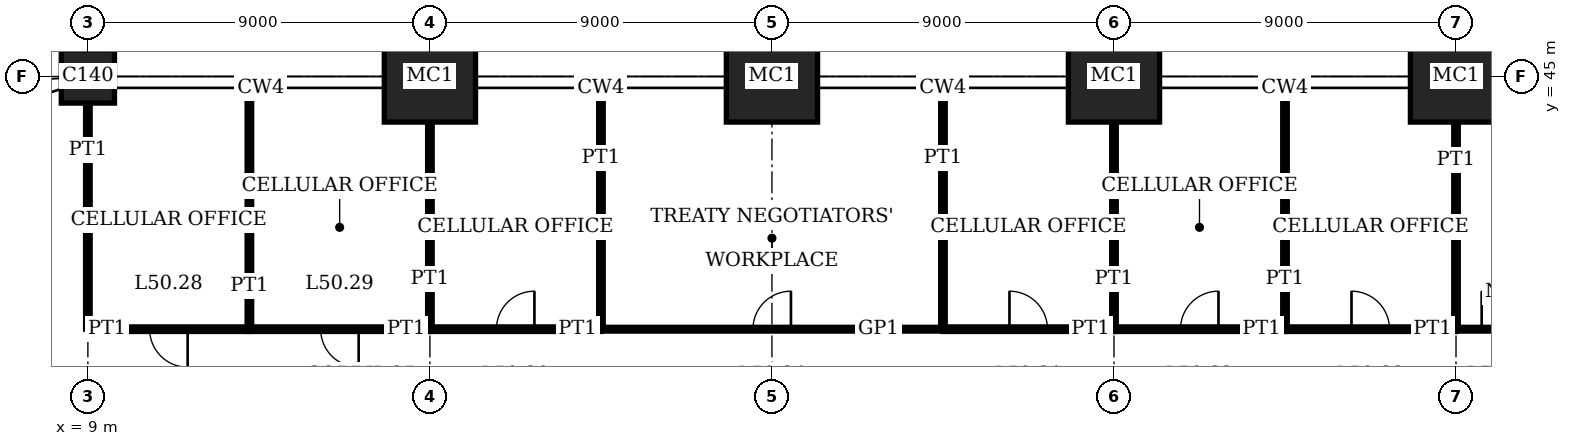
"""IFC4 building model, lengths in metres.
Left out: names, types, materials, properties, quantities, classifications, styles, units other than length and angle.
Written with IfcOpenShell. Run it as: python <this file> out.ifc"""

import sys

from ifc_helpers import new_model, si_unit, direction, frame, frame_2d, origin, origin_2d, place, context, subcontext, project, spatial, rectangle, extrude, element, fill, save


model = new_model("IFC4")
c1 = context("Model", 3, precision=1e-05, world=origin(), true_north=direction((0.0, 1.0)))
c2 = subcontext(c1, "Body", "Model", "MODEL_VIEW")
j1 = project(units=[si_unit("LENGTHUNIT", "METRE"), si_unit("PLANEANGLEUNIT", "RADIAN")], contexts=[c1])
p1 = place(None, origin())
s1 = spatial("IfcSite", under=j1, at=p1, CompositionType="ELEMENT")
p2 = place(p1, origin())
s2 = spatial("IfcBuilding", under=s1, at=p2, CompositionType="ELEMENT")
p3 = place(p2, frame((0.0, 0.0, 206.2)))
s3 = spatial("IfcBuildingStorey", under=s2, at=p3, CompositionType="ELEMENT", Elevation=206.2)
p4 = place(p3, frame((9.0, 45.0, 0.0), z_axis=(0.0, 0.0, 1.0), x_axis=(1.0, 0.0, 0.0)))
e1 = element("IfcColumn", 1, at=p4, inside=s3, PredefinedType="COLUMN", context=c2, shape_type="SweptSolid", body=[
    extrude(rectangle(XDim=1.4, YDim=1.4, at=origin_2d()), origin(), (0.0, 0.0, 1.0), 4.0),
])
for number, where, z_axis, x_axis in (
    (2, (18.0, 45.0, 0.0), (0.0, 0.0, 1.0), (1.0, 0.0, 0.0)),
    (3, (27.0, 45.0, 0.0), (0.0, 0.0, 1.0), (1.0, 0.0, 0.0)),
    (4, (36.0, 45.0, 0.0), (0.0, 0.0, 1.0), (1.0, 0.0, 0.0)),
    (5, (45.0, 45.0, 0.0), (0.0, 0.0, 1.0), (1.0, 0.0, 0.0)),
):
    element("IfcColumn", number, at=place(p3, frame(where, z_axis=z_axis, x_axis=x_axis)), inside=s3, PredefinedType="COLUMN", context=c2, shape_type="SweptSolid", body=[
        extrude(rectangle(XDim=2.4, YDim=2.4, at=origin_2d()), origin(), (0.0, 0.0, 1.0), 4.0),
    ])
p5 = place(p3, frame((9.0, 38.35, 0.0), z_axis=(0.0, 0.0, 1.0), x_axis=(1.0, 0.0, 0.0)))
e6 = element("IfcWall", 6, at=p5, inside=s3, PredefinedType="PARTITIONING", context=c2, shape_type="SweptSolid", body=[
    extrude(rectangle(XDim=4.25, YDim=0.12, at=frame_2d((2.125, 0.0))), origin(), (0.0, 0.0, 1.0), 3.75),
])
p6 = place(p5, frame((1.625, 0.0, 0.0)))
e7 = element("IfcOpeningElement", 7, at=p6, cuts=e6, PredefinedType="OPENING", context=c2, shape_type="SweptSolid", body=[
    extrude(rectangle(XDim=1.0, YDim=2.4, at=frame_2d((0.5, 1.2))), frame((0.0, 0.07, 0.0), z_axis=(0.0, -1.0, 0.0), x_axis=(1.0, 0.0, 0.0)), (0.0, 0.0, 1.0), 0.14),
])
p7 = place(p3, frame((13.25, 38.35, 0.0), z_axis=(0.0, 0.0, 1.0), x_axis=(1.0, 0.0, 0.0)))
e8 = element("IfcWall", 8, at=p7, inside=s3, PredefinedType="PARTITIONING", context=c2, shape_type="SweptSolid", body=[
    extrude(rectangle(XDim=4.75, YDim=0.12, at=frame_2d((2.375, 0.0))), origin(), (0.0, 0.0, 1.0), 3.75),
])
p8 = place(p7, frame((1.875, 0.0, 0.0)))
e9 = element("IfcOpeningElement", 9, at=p8, cuts=e8, PredefinedType="OPENING", context=c2, shape_type="SweptSolid", body=[
    extrude(rectangle(XDim=1.0, YDim=2.4, at=frame_2d((0.5, 1.2))), frame((0.0, 0.07, 0.0), z_axis=(0.0, -1.0, 0.0), x_axis=(1.0, 0.0, 0.0)), (0.0, 0.0, 1.0), 0.14),
])
p9 = place(p3, frame((18.0, 38.35, 0.0), z_axis=(0.0, 0.0, 1.0), x_axis=(1.0, 0.0, 0.0)))
e10 = element("IfcWall", 10, at=p9, inside=s3, PredefinedType="PARTITIONING", context=c2, shape_type="SweptSolid", body=[
    extrude(rectangle(XDim=4.5, YDim=0.12, at=frame_2d((2.25, 0.0))), origin(), (0.0, 0.0, 1.0), 3.75),
])
p10 = place(p9, frame((1.75, 0.0, 0.0)))
e11 = element("IfcOpeningElement", 11, at=p10, cuts=e10, PredefinedType="OPENING", context=c2, shape_type="SweptSolid", body=[
    extrude(rectangle(XDim=1.0, YDim=2.4, at=frame_2d((0.5, 1.2))), frame((0.0, 0.07, 0.0), z_axis=(0.0, -1.0, 0.0), x_axis=(1.0, 0.0, 0.0)), (0.0, 0.0, 1.0), 0.14),
])
p11 = place(p3, frame((31.5, 38.35, 0.0), z_axis=(0.0, 0.0, 1.0), x_axis=(1.0, 0.0, 0.0)))
e12 = element("IfcWall", 12, at=p11, inside=s3, PredefinedType="PARTITIONING", context=c2, shape_type="SweptSolid", body=[
    extrude(rectangle(XDim=4.5, YDim=0.12, at=frame_2d((2.25, 0.0))), origin(), (0.0, 0.0, 1.0), 3.75),
])
p12 = place(p11, frame((1.75, 0.0, 0.0)))
e13 = element("IfcOpeningElement", 13, at=p12, cuts=e12, PredefinedType="OPENING", context=c2, shape_type="SweptSolid", body=[
    extrude(rectangle(XDim=1.0, YDim=2.4, at=frame_2d((0.5, 1.2))), frame((0.0, 0.07, 0.0), z_axis=(0.0, -1.0, 0.0), x_axis=(1.0, 0.0, 0.0)), (0.0, 0.0, 1.0), 0.14),
])
p13 = place(p3, frame((36.0, 38.35, 0.0), z_axis=(0.0, 0.0, 1.0), x_axis=(1.0, 0.0, 0.0)))
e14 = element("IfcWall", 14, at=p13, inside=s3, PredefinedType="PARTITIONING", context=c2, shape_type="SweptSolid", body=[
    extrude(rectangle(XDim=4.5, YDim=0.12, at=frame_2d((2.25, 0.0))), origin(), (0.0, 0.0, 1.0), 3.75),
])
p14 = place(p13, frame((1.75, 0.0, 0.0)))
e15 = element("IfcOpeningElement", 15, at=p14, cuts=e14, PredefinedType="OPENING", context=c2, shape_type="SweptSolid", body=[
    extrude(rectangle(XDim=1.0, YDim=2.4, at=frame_2d((0.5, 1.2))), frame((0.0, 0.07, 0.0), z_axis=(0.0, -1.0, 0.0), x_axis=(1.0, 0.0, 0.0)), (0.0, 0.0, 1.0), 0.14),
])
p15 = place(p3, frame((40.5, 38.35, 0.0), z_axis=(0.0, 0.0, 1.0), x_axis=(1.0, 0.0, 0.0)))
e16 = element("IfcWall", 16, at=p15, inside=s3, PredefinedType="PARTITIONING", context=c2, shape_type="SweptSolid", body=[
    extrude(rectangle(XDim=4.5, YDim=0.12, at=frame_2d((2.25, 0.0))), origin(), (0.0, 0.0, 1.0), 3.75),
])
p16 = place(p15, frame((1.75, 0.0, 0.0)))
e17 = element("IfcOpeningElement", 17, at=p16, cuts=e16, PredefinedType="OPENING", context=c2, shape_type="SweptSolid", body=[
    extrude(rectangle(XDim=1.0, YDim=2.4, at=frame_2d((0.5, 1.2))), frame((0.0, 0.07, 0.0), z_axis=(0.0, -1.0, 0.0), x_axis=(1.0, 0.0, 0.0)), (0.0, 0.0, 1.0), 0.14),
])
p17 = place(p3, frame((22.5, 38.35, 0.0), z_axis=(0.0, 0.0, 1.0), x_axis=(1.0, 0.0, 0.0)))
e18 = element("IfcWall", 18, at=p17, inside=s3, PredefinedType="PARTITIONING", context=c2, shape_type="SweptSolid", body=[
    extrude(rectangle(XDim=9.0, YDim=0.1, at=frame_2d((4.5, 0.0))), origin(), (0.0, 0.0, 1.0), 3.75),
])
p18 = place(p17, frame((4.0, 0.0, 0.0)))
e19 = element("IfcOpeningElement", 19, at=p18, cuts=e18, PredefinedType="OPENING", context=c2, shape_type="SweptSolid", body=[
    extrude(rectangle(XDim=1.0, YDim=2.4, at=frame_2d((0.5, 1.2))), frame((0.0, 0.06, 0.0), z_axis=(0.0, -1.0, 0.0), x_axis=(1.0, 0.0, 0.0)), (0.0, 0.0, 1.0), 0.12),
])
p19 = place(p3, frame((45.0, 38.35, 0.0), z_axis=(0.0, 0.0, 1.0), x_axis=(1.0, 0.0, 0.0)))
e20 = element("IfcWall", 20, at=p19, inside=s3, PredefinedType="PARTITIONING", context=c2, shape_type="SweptSolid", body=[
    extrude(rectangle(XDim=2.35, YDim=0.1, at=frame_2d((1.175, 0.0))), origin(), (0.0, 0.0, 1.0), 3.75),
])
p20 = place(p19, frame((0.675, 0.0, 0.0)))
e21 = element("IfcOpeningElement", 21, at=p20, cuts=e20, PredefinedType="OPENING", context=c2, shape_type="SweptSolid", body=[
    extrude(rectangle(XDim=1.0, YDim=2.4, at=frame_2d((0.5, 1.2))), frame((0.0, 0.06, 0.0), z_axis=(0.0, -1.0, 0.0), x_axis=(1.0, 0.0, 0.0)), (0.0, 0.0, 1.0), 0.12),
])
p21 = place(p3, frame((9.0, 38.35, 0.0), z_axis=(0.0, 0.0, 1.0), x_axis=(0.0, 1.0, 0.0)))
e22 = element("IfcWall", 22, at=p21, inside=s3, PredefinedType="PARTITIONING", context=c2, shape_type="SweptSolid", body=[
    extrude(rectangle(XDim=5.95, YDim=0.12, at=frame_2d((2.975, 0.0))), origin(), (0.0, 0.0, 1.0), 3.05),
])
p22 = place(p3, frame((13.25, 38.35, 0.0), z_axis=(0.0, 0.0, 1.0), x_axis=(0.0, 1.0, 0.0)))
e23 = element("IfcWall", 23, at=p22, inside=s3, PredefinedType="PARTITIONING", context=c2, shape_type="SweptSolid", body=[
    extrude(rectangle(XDim=6.34, YDim=0.12, at=frame_2d((3.17, 0.0))), origin(), (0.0, 0.0, 1.0), 3.75),
])
p23 = place(p3, frame((18.0, 38.35, 0.0), z_axis=(0.0, 0.0, 1.0), x_axis=(0.0, 1.0, 0.0)))
e24 = element("IfcWall", 24, at=p23, inside=s3, PredefinedType="PARTITIONING", context=c2, shape_type="SweptSolid", body=[
    extrude(rectangle(XDim=5.45, YDim=0.12, at=frame_2d((2.725, 0.0))), origin(), (0.0, 0.0, 1.0), 3.05),
])
for number, where, z_axis, x_axis in (
    (25, (22.5, 38.35, 0.0), (0.0, 0.0, 1.0), (0.0, 1.0, 0.0)),
    (26, (31.5, 38.35, 0.0), (0.0, 0.0, 1.0), (0.0, 1.0, 0.0)),
):
    element("IfcWall", number, at=place(p3, frame(where, z_axis=z_axis, x_axis=x_axis)), inside=s3, PredefinedType="PARTITIONING", context=c2, shape_type="SweptSolid", body=[
        extrude(rectangle(XDim=6.34, YDim=0.12, at=frame_2d((3.17, 0.0))), origin(), (0.0, 0.0, 1.0), 3.75),
    ])
p24 = place(p3, frame((36.0, 38.35, 0.0), z_axis=(0.0, 0.0, 1.0), x_axis=(0.0, 1.0, 0.0)))
e27 = element("IfcWall", 27, at=p24, inside=s3, PredefinedType="PARTITIONING", context=c2, shape_type="SweptSolid", body=[
    extrude(rectangle(XDim=5.45, YDim=0.12, at=frame_2d((2.725, 0.0))), origin(), (0.0, 0.0, 1.0), 3.05),
])
p25 = place(p3, frame((40.5, 38.35, 0.0), z_axis=(0.0, 0.0, 1.0), x_axis=(0.0, 1.0, 0.0)))
e28 = element("IfcWall", 28, at=p25, inside=s3, PredefinedType="PARTITIONING", context=c2, shape_type="SweptSolid", body=[
    extrude(rectangle(XDim=6.34, YDim=0.12, at=frame_2d((3.17, 0.0))), origin(), (0.0, 0.0, 1.0), 3.75),
])
p26 = place(p3, frame((45.0, 38.35, 0.0), z_axis=(0.0, 0.0, 1.0), x_axis=(0.0, 1.0, 0.0)))
e29 = element("IfcWall", 29, at=p26, inside=s3, PredefinedType="PARTITIONING", context=c2, shape_type="SweptSolid", body=[
    extrude(rectangle(XDim=5.45, YDim=0.12, at=frame_2d((2.725, 0.0))), origin(), (0.0, 0.0, 1.0), 3.05),
])
p27 = place(p6, origin())
e30 = element("IfcDoor", 30, at=p27, inside=s3, OperationType="SINGLE_SWING_RIGHT", PredefinedType="DOOR", context=c2, shape_type="SweptSolid", body=[
    extrude(rectangle(XDim=1.0, YDim=2.4, at=frame_2d((0.5, 1.2))), frame((0.0, 0.025, 0.0), z_axis=(0.0, -1.0, 0.0), x_axis=(1.0, 0.0, 0.0)), (0.0, 0.0, 1.0), 0.05),
])
fill(e7, e30)
p28 = place(p8, origin())
e31 = element("IfcDoor", 31, at=p28, inside=s3, OperationType="SINGLE_SWING_RIGHT", PredefinedType="DOOR", context=c2, shape_type="SweptSolid", body=[
    extrude(rectangle(XDim=1.0, YDim=2.4, at=frame_2d((0.5, 1.2))), frame((0.0, 0.025, 0.0), z_axis=(0.0, -1.0, 0.0), x_axis=(1.0, 0.0, 0.0)), (0.0, 0.0, 1.0), 0.05),
])
fill(e9, e31)
p29 = place(p10, origin())
e32 = element("IfcDoor", 32, at=p29, inside=s3, OperationType="SINGLE_SWING_LEFT", PredefinedType="DOOR", context=c2, shape_type="SweptSolid", body=[
    extrude(rectangle(XDim=1.0, YDim=2.4, at=frame_2d((0.5, 1.2))), frame((0.0, 0.025, 0.0), z_axis=(0.0, -1.0, 0.0), x_axis=(1.0, 0.0, 0.0)), (0.0, 0.0, 1.0), 0.05),
])
fill(e11, e32)
p30 = place(p12, origin())
e33 = element("IfcDoor", 33, at=p30, inside=s3, OperationType="SINGLE_SWING_RIGHT", PredefinedType="DOOR", context=c2, shape_type="SweptSolid", body=[
    extrude(rectangle(XDim=1.0, YDim=2.4, at=frame_2d((0.5, 1.2))), frame((0.0, 0.025, 0.0), z_axis=(0.0, -1.0, 0.0), x_axis=(1.0, 0.0, 0.0)), (0.0, 0.0, 1.0), 0.05),
])
fill(e13, e33)
p31 = place(p14, origin())
e34 = element("IfcDoor", 34, at=p31, inside=s3, OperationType="SINGLE_SWING_LEFT", PredefinedType="DOOR", context=c2, shape_type="SweptSolid", body=[
    extrude(rectangle(XDim=1.0, YDim=2.4, at=frame_2d((0.5, 1.2))), frame((0.0, 0.025, 0.0), z_axis=(0.0, -1.0, 0.0), x_axis=(1.0, 0.0, 0.0)), (0.0, 0.0, 1.0), 0.05),
])
fill(e15, e34)
p32 = place(p16, origin())
e35 = element("IfcDoor", 35, at=p32, inside=s3, OperationType="SINGLE_SWING_RIGHT", PredefinedType="DOOR", context=c2, shape_type="SweptSolid", body=[
    extrude(rectangle(XDim=1.0, YDim=2.4, at=frame_2d((0.5, 1.2))), frame((0.0, 0.025, 0.0), z_axis=(0.0, -1.0, 0.0), x_axis=(1.0, 0.0, 0.0)), (0.0, 0.0, 1.0), 0.05),
])
fill(e17, e35)
p33 = place(p18, origin())
e36 = element("IfcDoor", 36, at=p33, inside=s3, OperationType="SINGLE_SWING_LEFT", PredefinedType="DOOR", context=c2, shape_type="SweptSolid", body=[
    extrude(rectangle(XDim=1.0, YDim=2.4, at=frame_2d((0.5, 1.2))), frame((0.0, 0.02, 0.0), z_axis=(0.0, -1.0, 0.0), x_axis=(1.0, 0.0, 0.0)), (0.0, 0.0, 1.0), 0.04),
])
fill(e19, e36)
p34 = place(p20, origin())
e37 = element("IfcDoor", 37, at=p34, inside=s3, OperationType="SINGLE_SWING_RIGHT", PredefinedType="DOOR", context=c2, shape_type="SweptSolid", body=[
    extrude(rectangle(XDim=1.0, YDim=2.4, at=frame_2d((0.5, 1.2))), frame((0.0, 0.02, 0.0), z_axis=(0.0, -1.0, 0.0), x_axis=(1.0, 0.0, 0.0)), (0.0, 0.0, 1.0), 0.04),
])
fill(e21, e37)
save(model, sys.argv[1])
